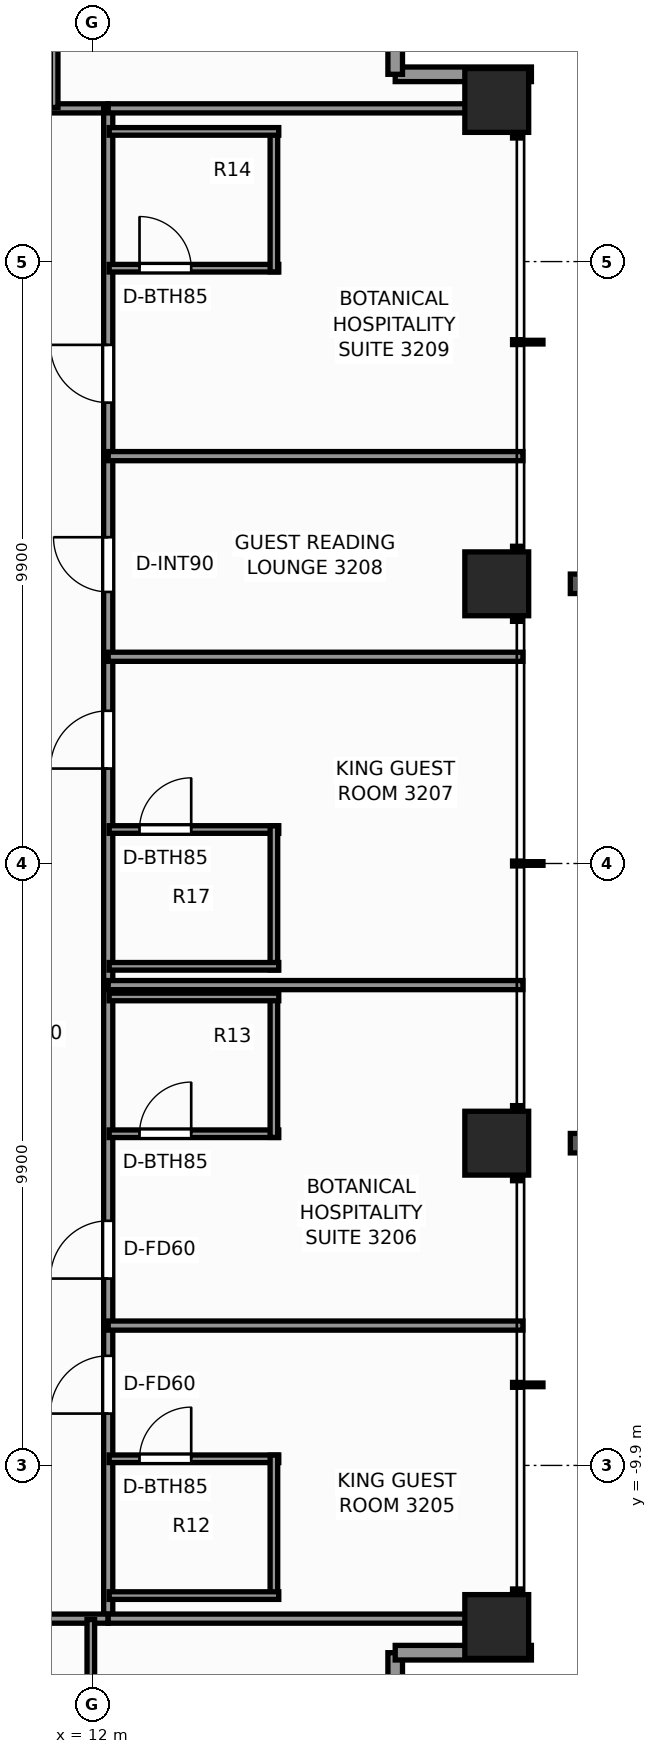
"""IFC4 building model, lengths in metres.
Left out: names, types, materials, properties, quantities, classifications, styles, units other than length and angle.
Written with IfcOpenShell. Run it as: python <this file> out.ifc"""

import sys

from ifc_helpers import new_model, si_unit, direction, frame, frame_2d, origin, origin_2d, place, context, subcontext, project, spatial, rectangle, extrude, element, fill, save


model = new_model("IFC4")
c1 = context("Model", 3, precision=1e-05, world=origin(), true_north=direction((0.0, 1.0)))
c2 = subcontext(c1, "Body", "Model", "MODEL_VIEW")
j1 = project(units=[si_unit("LENGTHUNIT", "METRE"), si_unit("PLANEANGLEUNIT", "RADIAN")], contexts=[c1])
p1 = place(None, origin())
s1 = spatial("IfcSite", under=j1, at=p1, CompositionType="ELEMENT")
p2 = place(p1, origin())
s2 = spatial("IfcBuilding", under=s1, at=p2, CompositionType="ELEMENT")
p3 = place(p2, frame((0.0, 0.0, 111.8)))
s3 = spatial("IfcBuildingStorey", under=s2, at=p3, CompositionType="ELEMENT", Elevation=111.8)
for number, where, z_axis, x_axis in (
    (1, (18.65, -12.55, 0.0), (0.0, 0.0, 1.0), (1.0, 0.0, 0.0)),
    (2, (18.65, -4.6, 0.0), (0.0, 0.0, 1.0), (1.0, 0.0, 0.0)),
    (3, (18.65, 4.6, 0.0), (0.0, 0.0, 1.0), (1.0, 0.0, 0.0)),
    (4, (18.65, 12.55, 0.0), (0.0, 0.0, 1.0), (1.0, 0.0, 0.0)),
):
    element("IfcColumn", number, at=place(p3, frame(where, z_axis=z_axis, x_axis=x_axis)), inside=s3, PredefinedType="COLUMN", context=c2, shape_type="SweptSolid", body=[
        extrude(rectangle(XDim=1.05, YDim=1.05, at=origin_2d()), origin(), (0.0, 0.0, 1.0), 3.3),
    ])
p4 = place(p3, frame((16.98, -12.98, 0.0), z_axis=(0.0, 0.0, 1.0), x_axis=(0.0, -1.0, 0.0)))
e5 = element("IfcWall", 5, at=p4, inside=s3, PredefinedType="STANDARD", context=c2, shape_type="SweptSolid", body=[
    extrude(rectangle(XDim=2.24, YDim=0.24, at=frame_2d((1.12, 0.0))), origin(), (0.0, 0.0, 1.0), 2.459),
])
p5 = place(p4, frame((0.45, 0.0, 0.65)))
e6 = element("IfcOpeningElement", 6, at=p5, cuts=e5, PredefinedType="OPENING", context=c2, shape_type="SweptSolid", body=[
    extrude(rectangle(XDim=1.1, YDim=1.45, at=frame_2d((0.55, 0.725))), frame((0.0, 0.13, 0.0), z_axis=(0.0, -1.0, 0.0), x_axis=(1.0, 0.0, 0.0)), (0.0, 0.0, 1.0), 0.26),
])
for number, where, z_axis, x_axis in (
    (7, (19.22, -12.98, 0.0), (0.0, 0.0, 1.0), (-1.0, 0.0, 0.0)),
    (8, (16.98, 12.98, 0.0), (0.0, 0.0, 1.0), (1.0, 0.0, 0.0)),
):
    element("IfcWall", number, at=place(p3, frame(where, z_axis=z_axis, x_axis=x_axis)), inside=s3, PredefinedType="STANDARD", context=c2, shape_type="SweptSolid", body=[
        extrude(rectangle(XDim=2.24, YDim=0.24, at=frame_2d((1.12, 0.0))), origin(), (0.0, 0.0, 1.0), 2.459),
    ])
p6 = place(p3, frame((16.98, 15.22, 0.0), z_axis=(0.0, 0.0, 1.0), x_axis=(0.0, -1.0, 0.0)))
e9 = element("IfcWall", 9, at=p6, inside=s3, PredefinedType="STANDARD", context=c2, shape_type="SweptSolid", body=[
    extrude(rectangle(XDim=2.24, YDim=0.24, at=frame_2d((1.12, 0.0))), origin(), (0.0, 0.0, 1.0), 2.459),
])
p7 = place(p6, frame((0.45, 0.0, 0.65)))
e10 = element("IfcOpeningElement", 10, at=p7, cuts=e9, PredefinedType="OPENING", context=c2, shape_type="SweptSolid", body=[
    extrude(rectangle(XDim=1.1, YDim=1.45, at=frame_2d((0.55, 0.725))), frame((0.0, 0.13, 0.0), z_axis=(0.0, -1.0, 0.0), x_axis=(1.0, 0.0, 0.0)), (0.0, 0.0, 1.0), 0.26),
])
p8 = place(p3, frame((-12.42, 12.42, 0.0), z_axis=(0.0, 0.0, 1.0), x_axis=(1.0, 0.0, 0.0)))
e11 = element("IfcWall", 11, at=p8, inside=s3, PredefinedType="PARTITIONING", context=c2, shape_type="SweptSolid", body=[
    extrude(rectangle(XDim=24.68, YDim=0.15, at=frame_2d((12.34, 0.0))), origin(), (0.0, 0.0, 1.0), 2.292),
])
p9 = place(p8, frame((3.781, 0.0, 0.0)))
e12 = element("IfcOpeningElement", 12, at=p9, cuts=e11, PredefinedType="OPENING", context=c2, shape_type="SweptSolid", body=[
    extrude(rectangle(XDim=0.9, YDim=2.06, at=frame_2d((0.45, 1.03))), frame((0.0, 0.085, 0.0), z_axis=(0.0, -1.0, 0.0), x_axis=(1.0, 0.0, 0.0)), (0.0, 0.0, 1.0), 0.17),
])
p10 = place(p8, frame((8.773, 0.0, 0.0)))
e13 = element("IfcOpeningElement", 13, at=p10, cuts=e11, PredefinedType="OPENING", context=c2, shape_type="SweptSolid", body=[
    extrude(rectangle(XDim=0.9, YDim=2.06, at=frame_2d((0.45, 1.03))), frame((0.0, 0.085, 0.0), z_axis=(0.0, -1.0, 0.0), x_axis=(1.0, 0.0, 0.0)), (0.0, 0.0, 1.0), 0.17),
])
p11 = place(p8, frame((10.656, 0.0, 0.0)))
e14 = element("IfcOpeningElement", 14, at=p11, cuts=e11, PredefinedType="OPENING", context=c2, shape_type="SweptSolid", body=[
    extrude(rectangle(XDim=0.9, YDim=2.06, at=frame_2d((0.45, 1.03))), frame((0.0, 0.085, 0.0), z_axis=(0.0, -1.0, 0.0), x_axis=(1.0, 0.0, 0.0)), (0.0, 0.0, 1.0), 0.17),
])
p12 = place(p8, frame((13.773, 0.0, 0.0)))
e15 = element("IfcOpeningElement", 15, at=p12, cuts=e11, PredefinedType="OPENING", context=c2, shape_type="SweptSolid", body=[
    extrude(rectangle(XDim=0.95, YDim=2.06, at=frame_2d((0.475, 1.03))), frame((0.0, 0.085, 0.0), z_axis=(0.0, -1.0, 0.0), x_axis=(1.0, 0.0, 0.0)), (0.0, 0.0, 1.0), 0.17),
])
p13 = place(p8, frame((18.0, 0.0, 0.0)))
e16 = element("IfcOpeningElement", 16, at=p13, cuts=e11, PredefinedType="OPENING", context=c2, shape_type="SweptSolid", body=[
    extrude(rectangle(XDim=0.9, YDim=2.06, at=frame_2d((0.45, 1.03))), frame((0.0, 0.085, 0.0), z_axis=(0.0, -1.0, 0.0), x_axis=(1.0, 0.0, 0.0)), (0.0, 0.0, 1.0), 0.17),
])
p14 = place(p8, frame((19.861, 0.0, 0.0)))
e17 = element("IfcOpeningElement", 17, at=p14, cuts=e11, PredefinedType="OPENING", context=c2, shape_type="SweptSolid", body=[
    extrude(rectangle(XDim=0.95, YDim=2.06, at=frame_2d((0.475, 1.03))), frame((0.0, 0.085, 0.0), z_axis=(0.0, -1.0, 0.0), x_axis=(1.0, 0.0, 0.0)), (0.0, 0.0, 1.0), 0.17),
])
p15 = place(p3, frame((12.26, -12.42, 0.0), z_axis=(0.0, 0.0, 1.0), x_axis=(0.0, 1.0, 0.0)))
e18 = element("IfcWall", 18, at=p15, inside=s3, PredefinedType="PARTITIONING", context=c2, shape_type="SweptSolid", body=[
    extrude(rectangle(XDim=24.84, YDim=0.15, at=frame_2d((12.42, 0.0))), origin(), (0.0, 0.0, 1.0), 2.292),
])
p16 = place(p15, frame((3.373, 0.0, 0.0)))
e19 = element("IfcOpeningElement", 19, at=p16, cuts=e18, PredefinedType="OPENING", context=c2, shape_type="SweptSolid", body=[
    extrude(rectangle(XDim=0.95, YDim=2.06, at=frame_2d((0.475, 1.03))), frame((0.0, 0.085, 0.0), z_axis=(0.0, -1.0, 0.0), x_axis=(1.0, 0.0, 0.0)), (0.0, 0.0, 1.0), 0.17),
])
p17 = place(p15, frame((5.593, 0.0, 0.0)))
e20 = element("IfcOpeningElement", 20, at=p17, cuts=e18, PredefinedType="OPENING", context=c2, shape_type="SweptSolid", body=[
    extrude(rectangle(XDim=0.95, YDim=2.06, at=frame_2d((0.475, 1.03))), frame((0.0, 0.085, 0.0), z_axis=(0.0, -1.0, 0.0), x_axis=(1.0, 0.0, 0.0)), (0.0, 0.0, 1.0), 0.17),
])
p18 = place(p15, frame((13.981, 0.0, 0.0)))
e21 = element("IfcOpeningElement", 21, at=p18, cuts=e18, PredefinedType="OPENING", context=c2, shape_type="SweptSolid", body=[
    extrude(rectangle(XDim=0.95, YDim=2.06, at=frame_2d((0.475, 1.03))), frame((0.0, 0.085, 0.0), z_axis=(0.0, -1.0, 0.0), x_axis=(1.0, 0.0, 0.0)), (0.0, 0.0, 1.0), 0.17),
])
p19 = place(p15, frame((16.886, 0.0, 0.0)))
e22 = element("IfcOpeningElement", 22, at=p19, cuts=e18, PredefinedType="OPENING", context=c2, shape_type="SweptSolid", body=[
    extrude(rectangle(XDim=0.9, YDim=2.06, at=frame_2d((0.45, 1.03))), frame((0.0, 0.085, 0.0), z_axis=(0.0, -1.0, 0.0), x_axis=(1.0, 0.0, 0.0)), (0.0, 0.0, 1.0), 0.17),
])
p20 = place(p15, frame((20.0, 0.0, 0.0)))
e23 = element("IfcOpeningElement", 23, at=p20, cuts=e18, PredefinedType="OPENING", context=c2, shape_type="SweptSolid", body=[
    extrude(rectangle(XDim=0.95, YDim=2.06, at=frame_2d((0.475, 1.03))), frame((0.0, 0.085, 0.0), z_axis=(0.0, -1.0, 0.0), x_axis=(1.0, 0.0, 0.0)), (0.0, 0.0, 1.0), 0.17),
])
p21 = place(p3, frame((-3.65, -12.42, 0.0), z_axis=(0.0, 0.0, 1.0), x_axis=(1.0, 0.0, 0.0)))
e24 = element("IfcWall", 24, at=p21, inside=s3, PredefinedType="PARTITIONING", context=c2, shape_type="SweptSolid", body=[
    extrude(rectangle(XDim=15.91, YDim=0.15, at=frame_2d((7.955, 0.0))), origin(), (0.0, 0.0, 1.0), 2.292),
])
p22 = place(p21, frame((4.612, 0.0, 0.0)))
e25 = element("IfcOpeningElement", 25, at=p22, cuts=e24, PredefinedType="OPENING", context=c2, shape_type="SweptSolid", body=[
    extrude(rectangle(XDim=0.95, YDim=2.06, at=frame_2d((0.475, 1.03))), frame((0.0, 0.085, 0.0), z_axis=(0.0, -1.0, 0.0), x_axis=(1.0, 0.0, 0.0)), (0.0, 0.0, 1.0), 0.17),
])
p23 = place(p21, frame((9.17, 0.0, 0.0)))
e26 = element("IfcOpeningElement", 26, at=p23, cuts=e24, PredefinedType="OPENING", context=c2, shape_type="SweptSolid", body=[
    extrude(rectangle(XDim=0.95, YDim=2.06, at=frame_2d((0.475, 1.03))), frame((0.0, 0.085, 0.0), z_axis=(0.0, -1.0, 0.0), x_axis=(1.0, 0.0, 0.0)), (0.0, 0.0, 1.0), 0.17),
])
p24 = place(p21, frame((11.192, 0.0, 0.0)))
e27 = element("IfcOpeningElement", 27, at=p24, cuts=e24, PredefinedType="OPENING", context=c2, shape_type="SweptSolid", body=[
    extrude(rectangle(XDim=0.95, YDim=2.06, at=frame_2d((0.475, 1.03))), frame((0.0, 0.085, 0.0), z_axis=(0.0, -1.0, 0.0), x_axis=(1.0, 0.0, 0.0)), (0.0, 0.0, 1.0), 0.17),
])
for number, where, z_axis, x_axis in (
    (28, (12.26, -12.42, 0.0), (0.0, 0.0, 1.0), (1.0, 0.0, 0.0)),
    (29, (12.26, 12.42, 0.0), (0.0, 0.0, 1.0), (1.0, 0.0, 0.0)),
):
    element("IfcWall", number, at=place(p3, frame(where, z_axis=z_axis, x_axis=x_axis)), inside=s3, PredefinedType="PARTITIONING", context=c2, shape_type="SweptSolid", body=[
        extrude(rectangle(XDim=6.82, YDim=0.15, at=frame_2d((3.41, 0.0))), origin(), (0.0, 0.0, 1.0), 2.292),
    ])
p25 = place(p3, frame((11.371, 12.435, 0.0), z_axis=(0.0, 0.0, 1.0), x_axis=(0.0, 1.0, 0.0)))
e30 = element("IfcWall", 30, at=p25, inside=s3, PredefinedType="PARTITIONING", context=c2, shape_type="SweptSolid", body=[
    extrude(rectangle(XDim=2.79, YDim=0.125, at=frame_2d((1.395, 0.0))), origin(), (0.0, 0.0, 1.0), 2.292),
])
p26 = place(p3, frame((12.26, -7.6, 0.0), z_axis=(0.0, 0.0, 1.0), x_axis=(1.0, 0.0, 0.0)))
e31 = element("IfcWall", 31, at=p26, inside=s3, PredefinedType="PARTITIONING", context=c2, shape_type="SweptSolid", body=[
    extrude(rectangle(XDim=6.82, YDim=0.15, at=frame_2d((3.41, 0.0))), origin(), (0.0, 0.0, 1.0), 2.449),
])
p27 = place(p3, frame((12.275, -9.791, 0.0), z_axis=(0.0, 0.0, 1.0), x_axis=(1.0, 0.0, 0.0)))
e32 = element("IfcWall", 32, at=p27, inside=s3, PredefinedType="PARTITIONING", context=c2, shape_type="SweptSolid", body=[
    extrude(rectangle(XDim=2.79, YDim=0.125, at=frame_2d((1.395, 0.0))), origin(), (0.0, 0.0, 1.0), 3.08),
])
p28 = place(p27, frame((0.5, 0.0, 0.0)))
e33 = element("IfcOpeningElement", 33, at=p28, cuts=e32, PredefinedType="OPENING", context=c2, shape_type="SweptSolid", body=[
    extrude(rectangle(XDim=0.85, YDim=2.03, at=frame_2d((0.425, 1.015))), frame((0.0, 0.073, 0.0), z_axis=(0.0, -1.0, 0.0), x_axis=(1.0, 0.0, 0.0)), (0.0, 0.0, 1.0), 0.145),
])
p29 = place(p3, frame((14.985, -12.101, 0.0), z_axis=(0.0, 0.0, 1.0), x_axis=(0.0, 1.0, 0.0)))
e34 = element("IfcWall", 34, at=p29, inside=s3, PredefinedType="PARTITIONING", context=c2, shape_type="SweptSolid", body=[
    extrude(rectangle(XDim=2.37, YDim=0.125, at=frame_2d((1.185, 0.0))), origin(), (0.0, 0.0, 1.0), 2.292),
])
p30 = place(p3, frame((12.275, -12.041, 0.0), z_axis=(0.0, 0.0, 1.0), x_axis=(1.0, 0.0, 0.0)))
e35 = element("IfcWall", 35, at=p30, inside=s3, PredefinedType="PARTITIONING", context=c2, shape_type="SweptSolid", body=[
    extrude(rectangle(XDim=2.79, YDim=0.125, at=frame_2d((1.395, 0.0))), origin(), (0.0, 0.0, 1.0), 3.08),
])
p31 = place(p3, frame((12.26, -2.0, 0.0), z_axis=(0.0, 0.0, 1.0), x_axis=(1.0, 0.0, 0.0)))
e36 = element("IfcWall", 36, at=p31, inside=s3, PredefinedType="PARTITIONING", context=c2, shape_type="SweptSolid", body=[
    extrude(rectangle(XDim=6.82, YDim=0.15, at=frame_2d((3.41, 0.0))), origin(), (0.0, 0.0, 1.0), 2.449),
])
p32 = place(p3, frame((12.275, -4.445, 0.0), z_axis=(0.0, 0.0, 1.0), x_axis=(1.0, 0.0, 0.0)))
e37 = element("IfcWall", 37, at=p32, inside=s3, PredefinedType="PARTITIONING", context=c2, shape_type="SweptSolid", body=[
    extrude(rectangle(XDim=2.79, YDim=0.125, at=frame_2d((1.395, 0.0))), origin(), (0.0, 0.0, 1.0), 2.292),
])
p33 = place(p32, frame((0.5, 0.0, 0.0)))
e38 = element("IfcOpeningElement", 38, at=p33, cuts=e37, PredefinedType="OPENING", context=c2, shape_type="SweptSolid", body=[
    extrude(rectangle(XDim=0.85, YDim=2.03, at=frame_2d((0.425, 1.015))), frame((0.0, 0.073, 0.0), z_axis=(0.0, -1.0, 0.0), x_axis=(1.0, 0.0, 0.0)), (0.0, 0.0, 1.0), 0.145),
])
p34 = place(p3, frame((14.985, -4.505, 0.0), z_axis=(0.0, 0.0, 1.0), x_axis=(0.0, 1.0, 0.0)))
e39 = element("IfcWall", 39, at=p34, inside=s3, PredefinedType="PARTITIONING", context=c2, shape_type="SweptSolid", body=[
    extrude(rectangle(XDim=2.37, YDim=0.125, at=frame_2d((1.185, 0.0))), origin(), (0.0, 0.0, 1.0), 2.292),
])
p35 = place(p3, frame((12.275, -2.195, 0.0), z_axis=(0.0, 0.0, 1.0), x_axis=(1.0, 0.0, 0.0)))
e40 = element("IfcWall", 40, at=p35, inside=s3, PredefinedType="PARTITIONING", context=c2, shape_type="SweptSolid", body=[
    extrude(rectangle(XDim=2.79, YDim=0.125, at=frame_2d((1.395, 0.0))), origin(), (0.0, 0.0, 1.0), 3.08),
])
p36 = place(p3, frame((12.26, 3.4, 0.0), z_axis=(0.0, 0.0, 1.0), x_axis=(1.0, 0.0, 0.0)))
e41 = element("IfcWall", 41, at=p36, inside=s3, PredefinedType="PARTITIONING", context=c2, shape_type="SweptSolid", body=[
    extrude(rectangle(XDim=6.82, YDim=0.15, at=frame_2d((3.41, 0.0))), origin(), (0.0, 0.0, 1.0), 2.449),
])
p37 = place(p3, frame((12.275, 0.559, 0.0), z_axis=(0.0, 0.0, 1.0), x_axis=(1.0, 0.0, 0.0)))
e42 = element("IfcWall", 42, at=p37, inside=s3, PredefinedType="PARTITIONING", context=c2, shape_type="SweptSolid", body=[
    extrude(rectangle(XDim=2.79, YDim=0.125, at=frame_2d((1.395, 0.0))), origin(), (0.0, 0.0, 1.0), 3.08),
])
p38 = place(p37, frame((0.5, 0.0, 0.0)))
e43 = element("IfcOpeningElement", 43, at=p38, cuts=e42, PredefinedType="OPENING", context=c2, shape_type="SweptSolid", body=[
    extrude(rectangle(XDim=0.85, YDim=2.03, at=frame_2d((0.425, 1.015))), frame((0.0, 0.073, 0.0), z_axis=(0.0, -1.0, 0.0), x_axis=(1.0, 0.0, 0.0)), (0.0, 0.0, 1.0), 0.145),
])
p39 = place(p3, frame((14.985, -1.751, 0.0), z_axis=(0.0, 0.0, 1.0), x_axis=(0.0, 1.0, 0.0)))
e44 = element("IfcWall", 44, at=p39, inside=s3, PredefinedType="PARTITIONING", context=c2, shape_type="SweptSolid", body=[
    extrude(rectangle(XDim=2.37, YDim=0.125, at=frame_2d((1.185, 0.0))), origin(), (0.0, 0.0, 1.0), 2.605),
])
p40 = place(p3, frame((12.275, -1.691, 0.0), z_axis=(0.0, 0.0, 1.0), x_axis=(1.0, 0.0, 0.0)))
e45 = element("IfcWall", 45, at=p40, inside=s3, PredefinedType="PARTITIONING", context=c2, shape_type="SweptSolid", body=[
    extrude(rectangle(XDim=2.79, YDim=0.125, at=frame_2d((1.395, 0.0))), origin(), (0.0, 0.0, 1.0), 3.08),
])
p41 = place(p3, frame((12.26, 6.7, 0.0), z_axis=(0.0, 0.0, 1.0), x_axis=(1.0, 0.0, 0.0)))
e46 = element("IfcWall", 46, at=p41, inside=s3, PredefinedType="PARTITIONING", context=c2, shape_type="SweptSolid", body=[
    extrude(rectangle(XDim=6.82, YDim=0.15, at=frame_2d((3.41, 0.0))), origin(), (0.0, 0.0, 1.0), 2.449),
])
p42 = place(p3, frame((12.275, 9.791, 0.0), z_axis=(0.0, 0.0, 1.0), x_axis=(1.0, 0.0, 0.0)))
e47 = element("IfcWall", 47, at=p42, inside=s3, PredefinedType="PARTITIONING", context=c2, shape_type="SweptSolid", body=[
    extrude(rectangle(XDim=2.79, YDim=0.125, at=frame_2d((1.395, 0.0))), origin(), (0.0, 0.0, 1.0), 3.08),
])
p43 = place(p42, frame((0.5, 0.0, 0.0)))
e48 = element("IfcOpeningElement", 48, at=p43, cuts=e47, PredefinedType="OPENING", context=c2, shape_type="SweptSolid", body=[
    extrude(rectangle(XDim=0.85, YDim=2.03, at=frame_2d((0.425, 1.015))), frame((0.0, 0.073, 0.0), z_axis=(0.0, -1.0, 0.0), x_axis=(1.0, 0.0, 0.0)), (0.0, 0.0, 1.0), 0.145),
])
p44 = place(p3, frame((14.985, 9.731, 0.0), z_axis=(0.0, 0.0, 1.0), x_axis=(0.0, 1.0, 0.0)))
e49 = element("IfcWall", 49, at=p44, inside=s3, PredefinedType="PARTITIONING", context=c2, shape_type="SweptSolid", body=[
    extrude(rectangle(XDim=2.37, YDim=0.125, at=frame_2d((1.185, 0.0))), origin(), (0.0, 0.0, 1.0), 2.292),
])
for number, where, z_axis, x_axis in (
    (50, (12.275, 12.041, 0.0), (0.0, 0.0, 1.0), (1.0, 0.0, 0.0)),
    (51, (11.974, -15.225, 0.0), (0.0, 0.0, 1.0), (0.0, 1.0, 0.0)),
):
    element("IfcWall", number, at=place(p3, frame(where, z_axis=z_axis, x_axis=x_axis)), inside=s3, PredefinedType="PARTITIONING", context=c2, shape_type="SweptSolid", body=[
        extrude(rectangle(XDim=2.79, YDim=0.125, at=frame_2d((1.395, 0.0))), origin(), (0.0, 0.0, 1.0), 3.08),
    ])
p45 = place(p28, origin())
e52 = element("IfcDoor", 52, at=p45, inside=s3, OperationType="SINGLE_SWING_RIGHT", PredefinedType="DOOR", context=c2, shape_type="SweptSolid", body=[
    extrude(rectangle(XDim=0.85, YDim=2.03, at=frame_2d((0.425, 1.015))), frame((0.0, 0.025, 0.0), z_axis=(0.0, -1.0, 0.0), x_axis=(1.0, 0.0, 0.0)), (0.0, 0.0, 1.0), 0.05),
])
fill(e33, e52)
p46 = place(p16, origin())
e53 = element("IfcDoor", 53, at=p46, inside=s3, OperationType="SINGLE_SWING_LEFT", PredefinedType="DOOR", context=c2, shape_type="SweptSolid", body=[
    extrude(rectangle(XDim=0.95, YDim=2.06, at=frame_2d((0.475, 1.03))), frame((0.0, 0.025, 0.0), z_axis=(0.0, -1.0, 0.0), x_axis=(1.0, 0.0, 0.0)), (0.0, 0.0, 1.0), 0.05),
])
fill(e19, e53)
p47 = place(p33, origin())
e54 = element("IfcDoor", 54, at=p47, inside=s3, OperationType="SINGLE_SWING_RIGHT", PredefinedType="DOOR", context=c2, shape_type="SweptSolid", body=[
    extrude(rectangle(XDim=0.85, YDim=2.03, at=frame_2d((0.425, 1.015))), frame((0.0, 0.025, 0.0), z_axis=(0.0, -1.0, 0.0), x_axis=(1.0, 0.0, 0.0)), (0.0, 0.0, 1.0), 0.05),
])
fill(e38, e54)
p48 = place(p17, origin())
e55 = element("IfcDoor", 55, at=p48, inside=s3, OperationType="SINGLE_SWING_LEFT", PredefinedType="DOOR", context=c2, shape_type="SweptSolid", body=[
    extrude(rectangle(XDim=0.95, YDim=2.06, at=frame_2d((0.475, 1.03))), frame((0.0, 0.025, 0.0), z_axis=(0.0, -1.0, 0.0), x_axis=(1.0, 0.0, 0.0)), (0.0, 0.0, 1.0), 0.05),
])
fill(e20, e55)
p49 = place(p38, origin())
e56 = element("IfcDoor", 56, at=p49, inside=s3, OperationType="SINGLE_SWING_RIGHT", PredefinedType="DOOR", context=c2, shape_type="SweptSolid", body=[
    extrude(rectangle(XDim=0.85, YDim=2.03, at=frame_2d((0.425, 1.015))), frame((0.0, 0.025, 0.0), z_axis=(0.0, -1.0, 0.0), x_axis=(1.0, 0.0, 0.0)), (0.0, 0.0, 1.0), 0.05),
])
fill(e43, e56)
p50 = place(p18, origin())
e57 = element("IfcDoor", 57, at=p50, inside=s3, OperationType="SINGLE_SWING_LEFT", PredefinedType="DOOR", context=c2, shape_type="SweptSolid", body=[
    extrude(rectangle(XDim=0.95, YDim=2.06, at=frame_2d((0.475, 1.03))), frame((0.0, 0.025, 0.0), z_axis=(0.0, -1.0, 0.0), x_axis=(1.0, 0.0, 0.0)), (0.0, 0.0, 1.0), 0.05),
])
fill(e21, e57)
p51 = place(p19, origin())
e58 = element("IfcDoor", 58, at=p51, inside=s3, OperationType="SINGLE_SWING_RIGHT", PredefinedType="DOOR", context=c2, shape_type="SweptSolid", body=[
    extrude(rectangle(XDim=0.9, YDim=2.06, at=frame_2d((0.45, 1.03))), frame((0.0, 0.025, 0.0), z_axis=(0.0, -1.0, 0.0), x_axis=(1.0, 0.0, 0.0)), (0.0, 0.0, 1.0), 0.05),
])
fill(e22, e58)
p52 = place(p43, origin())
e59 = element("IfcDoor", 59, at=p52, inside=s3, OperationType="SINGLE_SWING_LEFT", PredefinedType="DOOR", context=c2, shape_type="SweptSolid", body=[
    extrude(rectangle(XDim=0.85, YDim=2.03, at=frame_2d((0.425, 1.015))), frame((0.0, 0.025, 0.0), z_axis=(0.0, -1.0, 0.0), x_axis=(1.0, 0.0, 0.0)), (0.0, 0.0, 1.0), 0.05),
])
fill(e48, e59)
p53 = place(p20, origin())
e60 = element("IfcDoor", 60, at=p53, inside=s3, OperationType="SINGLE_SWING_RIGHT", PredefinedType="DOOR", context=c2, shape_type="SweptSolid", body=[
    extrude(rectangle(XDim=0.95, YDim=2.06, at=frame_2d((0.475, 1.03))), frame((0.0, 0.025, 0.0), z_axis=(0.0, -1.0, 0.0), x_axis=(1.0, 0.0, 0.0)), (0.0, 0.0, 1.0), 0.05),
])
fill(e23, e60)
save(model, sys.argv[1])
